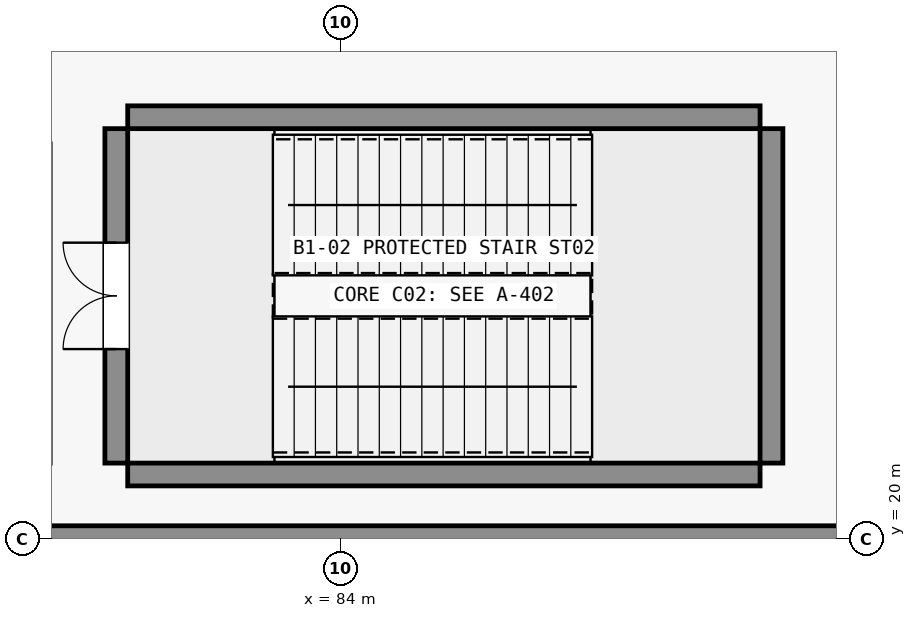
"""IFC4 building model, lengths in metres.
Left out: names, types, materials, properties, quantities, classifications, styles, units other than length and angle.
Written with IfcOpenShell. Run it as: python <this file> out.ifc"""

import sys

from ifc_helpers import new_model, si_unit, direction, frame, frame_2d, origin, place, context, subcontext, project, spatial, rectangle, extrude, element, fill, save


model = new_model("IFC4")
c1 = context("Model", 3, precision=1e-05, world=origin(), true_north=direction((0.0, 1.0)))
c2 = subcontext(c1, "Body", "Model", "MODEL_VIEW")
j1 = project(units=[si_unit("LENGTHUNIT", "METRE"), si_unit("PLANEANGLEUNIT", "RADIAN")], contexts=[c1])
p1 = place(None, origin())
s1 = spatial("IfcSite", under=j1, at=p1, CompositionType="ELEMENT")
p2 = place(p1, origin())
s2 = spatial("IfcBuilding", under=s1, at=p2, CompositionType="ELEMENT")
p3 = place(p2, frame((0.0, 0.0, -5.4)))
s3 = spatial("IfcBuildingStorey", under=s2, at=p3, CompositionType="ELEMENT", Elevation=-5.4)
for number, where, z_axis, x_axis in (
    (1, (81.2, 20.85, 0.0), (0.0, 0.0, 1.0), (1.0, 0.0, 0.0)),
    (2, (81.2, 25.55, 0.0), (0.0, 0.0, 1.0), (1.0, 0.0, 0.0)),
):
    element("IfcWall", number, at=place(p3, frame(where, z_axis=z_axis, x_axis=x_axis)), inside=s3, PredefinedType="SHEAR", context=c2, shape_type="SweptSolid", body=[
        extrude(rectangle(XDim=8.32, YDim=0.3, at=frame_2d((4.16, 0.0))), origin(), (0.0, 0.0, 1.0), 5.4),
    ])
p4 = place(p3, frame((81.05, 21.0, 0.0), z_axis=(0.0, 0.0, 1.0), x_axis=(0.0, 1.0, 0.0)))
e3 = element("IfcWall", 3, at=p4, inside=s3, PredefinedType="SHEAR", context=c2, shape_type="SweptSolid", body=[
    extrude(rectangle(XDim=4.4, YDim=0.3, at=frame_2d((2.2, 0.0))), origin(), (0.0, 0.0, 1.0), 5.4),
])
p5 = place(p4, frame((1.5, 0.0, 0.0)))
e4 = element("IfcOpeningElement", 4, at=p5, cuts=e3, PredefinedType="OPENING", context=c2, shape_type="SweptSolid", body=[
    extrude(rectangle(XDim=1.4, YDim=2.2, at=frame_2d((0.7, 1.1))), frame((0.0, 0.16, 0.0), z_axis=(0.0, -1.0, 0.0), x_axis=(1.0, 0.0, 0.0)), (0.0, 0.0, 1.0), 0.32),
])
p6 = place(p3, frame((89.67, 21.0, 0.0), z_axis=(0.0, 0.0, 1.0), x_axis=(0.0, 1.0, 0.0)))
e5 = element("IfcWall", 5, at=p6, inside=s3, PredefinedType="SHEAR", context=c2, shape_type="SweptSolid", body=[
    extrude(rectangle(XDim=4.4, YDim=0.3, at=frame_2d((2.2, 0.0))), origin(), (0.0, 0.0, 1.0), 5.4),
])
p7 = place(p3, frame((29.3, 20.0, 0.0), z_axis=(0.0, 0.0, 1.0), x_axis=(1.0, 0.0, 0.0)))
e6 = element("IfcWall", 6, at=p7, inside=s3, PredefinedType="SOLIDWALL", context=c2, shape_type="SweptSolid", body=[
    extrude(rectangle(XDim=64.4, YDim=0.35, at=frame_2d((32.2, 0.0))), origin(), (0.0, 0.0, 1.0), 4.96),
])
p8 = place(p5, origin())
e7 = element("IfcDoor", 7, at=p8, inside=s3, OperationType="DOUBLE_DOOR_SINGLE_SWING", PredefinedType="DOOR", context=c2, shape_type="SweptSolid", body=[
    extrude(rectangle(XDim=1.4, YDim=2.2, at=frame_2d((0.7, 1.1))), frame((0.0, 0.025, 0.0), z_axis=(0.0, -1.0, 0.0), x_axis=(1.0, 0.0, 0.0)), (0.0, 0.0, 1.0), 0.05),
])
fill(e4, e7)
save(model, sys.argv[1])
